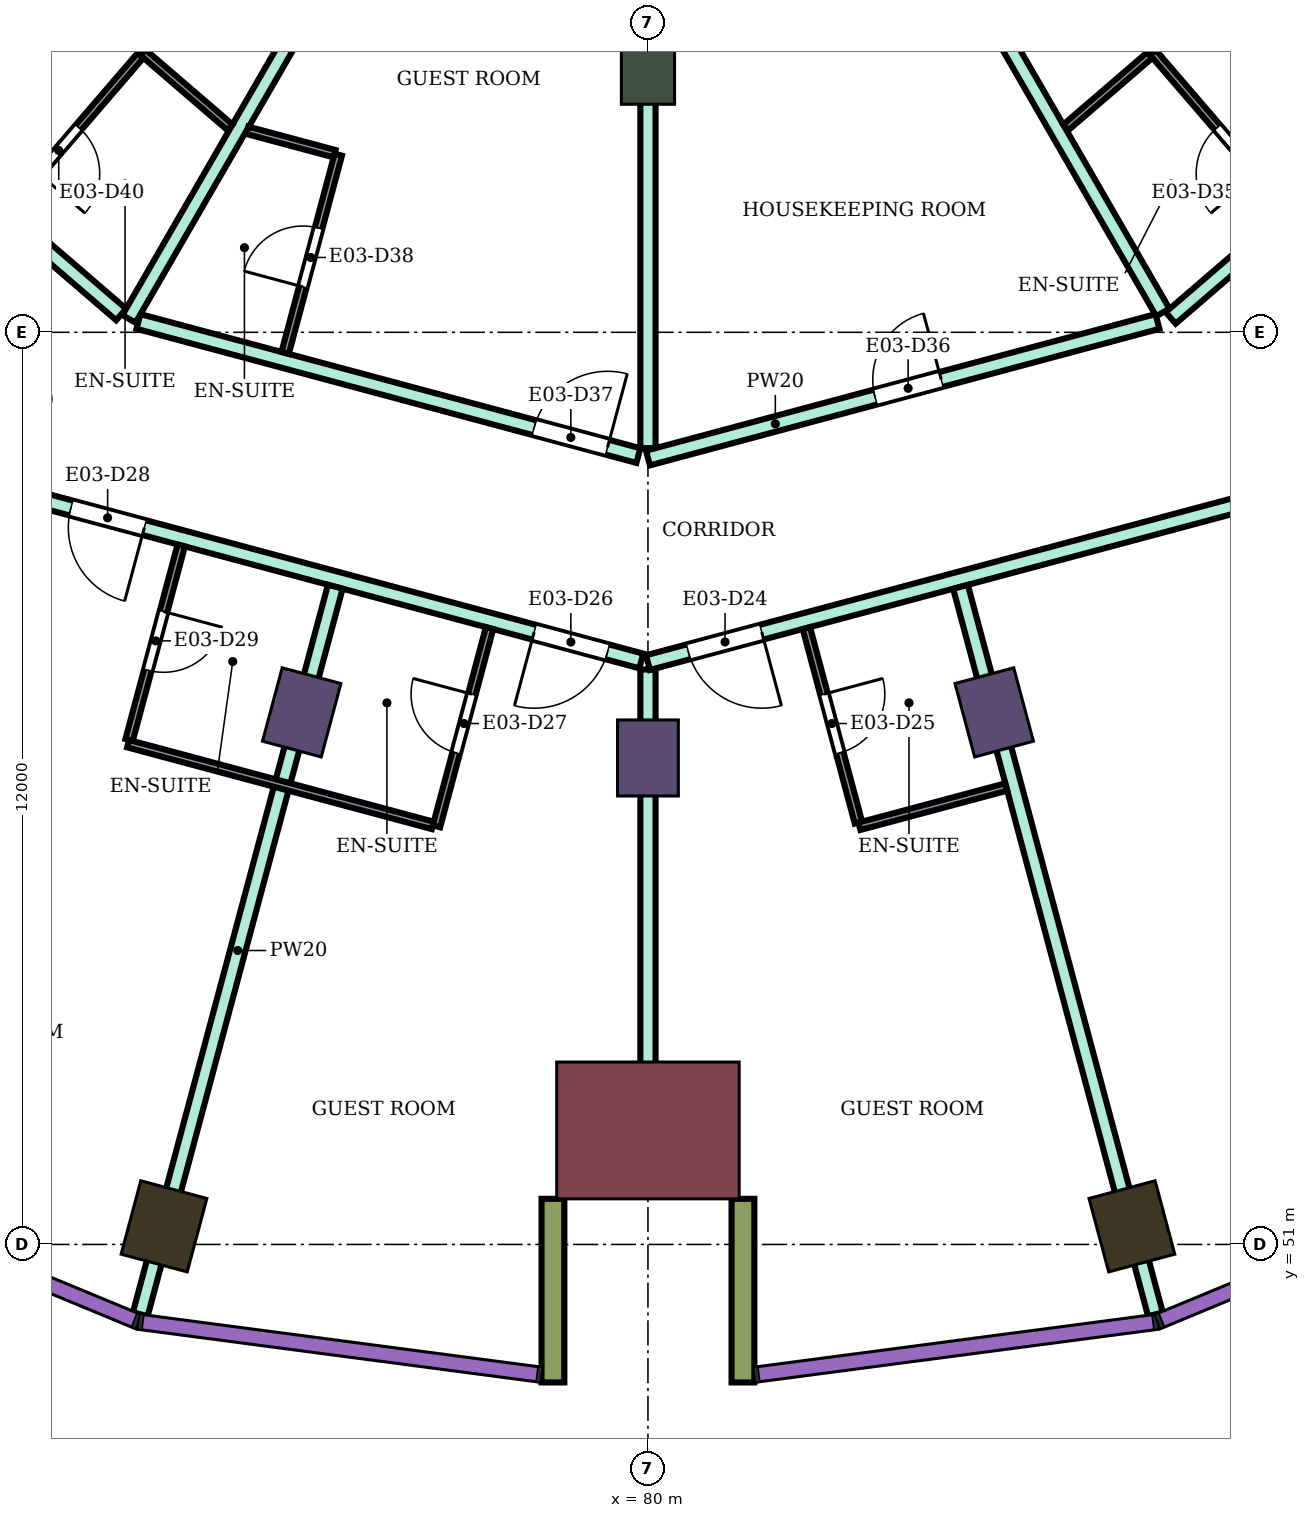
"""IFC4 building model, lengths in metres.
Left out: names, types, materials, properties, quantities, classifications, styles, units other than length and angle.
Written with IfcOpenShell. Run it as: python <this file> out.ifc"""

import sys

from ifc_helpers import new_model, si_unit, direction, frame, frame_2d, origin, origin_2d, place, context, subcontext, project, spatial, rectangle, extrude, element, fill, save


model = new_model("IFC4")
c1 = context("Model", 3, precision=1e-05, world=origin(), true_north=direction((0.0, 1.0)))
c2 = subcontext(c1, "Body", "Model", "MODEL_VIEW")
j1 = project(units=[si_unit("LENGTHUNIT", "METRE"), si_unit("PLANEANGLEUNIT", "RADIAN")], contexts=[c1])
p1 = place(None, origin())
s1 = spatial("IfcSite", under=j1, at=p1, CompositionType="ELEMENT")
p2 = place(p1, origin())
s2 = spatial("IfcBuilding", under=s1, at=p2, CompositionType="ELEMENT")
p3 = place(p2, frame((0.0, 0.0, 145.8)))
s3 = spatial("IfcBuildingStorey", under=s2, at=p3, CompositionType="ELEMENT", Elevation=145.8)
for number, where, z_axis, x_axis in (
    (1, (73.633, 51.238, 0.0), (0.0, 0.0, 1.0), (-0.259, -0.966, 0.0)),
    (2, (86.367, 51.238, 0.0), (0.0, 0.0, 1.0), (0.259, -0.966, 0.0)),
):
    element("IfcColumn", number, at=place(p3, frame(where, z_axis=z_axis, x_axis=x_axis)), inside=s3, PredefinedType="COLUMN", context=c2, shape_type="SweptSolid", body=[
        extrude(rectangle(XDim=1.0, YDim=0.9, at=origin_2d()), origin(), (0.0, 0.0, 1.0), 3.9),
    ])
for number, where, z_axis, x_axis in (
    (3, (75.445, 58.0, 0.0), (0.0, 0.0, 1.0), (-0.259, -0.966, 0.0)),
    (4, (80.0, 57.4, 0.0), (0.0, 0.0, 1.0), (0.0, -1.0, 0.0)),
    (5, (84.555, 58.0, 0.0), (0.0, 0.0, 1.0), (0.259, -0.966, 0.0)),
):
    element("IfcColumn", number, at=place(p3, frame(where, z_axis=z_axis, x_axis=x_axis)), inside=s3, PredefinedType="COLUMN", context=c2, shape_type="SweptSolid", body=[
        extrude(rectangle(XDim=1.0, YDim=0.8, at=origin_2d()), origin(), (0.0, 0.0, 1.0), 3.9),
    ])
p4 = place(p3, frame((80.0, 66.4, 0.0), z_axis=(0.0, 0.0, 1.0), x_axis=(0.0, -1.0, 0.0)))
e6 = element("IfcColumn", 6, at=p4, inside=s3, PredefinedType="COLUMN", context=c2, shape_type="SweptSolid", body=[
    extrude(rectangle(XDim=0.8, YDim=0.7, at=origin_2d()), origin(), (0.0, 0.0, 1.0), 3.9),
])
p5 = place(p3, frame((80.0, 52.5, 0.0), z_axis=(0.0, 0.0, 1.0), x_axis=(0.0, -1.0, 0.0)))
e7 = element("IfcColumn", 7, at=p5, inside=s3, PredefinedType="COLUMN", context=c2, shape_type="SweptSolid", body=[
    extrude(rectangle(XDim=1.8, YDim=2.4, at=origin_2d()), origin(), (0.0, 0.0, 1.0), 3.9),
])
for number, where, z_axis, x_axis in (
    (8, (78.75, 51.6, 0.0), (0.0, 0.0, 1.0), (0.0, -1.0, 0.0)),
    (9, (81.25, 51.6, 0.0), (0.0, 0.0, 1.0), (0.0, -1.0, 0.0)),
):
    element("IfcWall", number, at=place(p3, frame(where, z_axis=z_axis, x_axis=x_axis)), inside=s3, PredefinedType="NOTDEFINED", context=c2, shape_type="SweptSolid", body=[
        extrude(rectangle(XDim=2.416, YDim=0.3, at=frame_2d((1.208, 0.0))), origin(), (0.0, 0.0, 1.0), 3.9),
    ])
p6 = place(p3, frame((69.158, 66.6, 0.0), z_axis=(0.0, 0.0, 1.0), x_axis=(0.757976058094, -0.652282373943, 0.0)))
e10 = element("IfcWall", 10, at=p6, inside=s3, PredefinedType="PARTITIONING", context=c2, shape_type="SweptSolid", body=[
    extrude(rectangle(XDim=5.16, YDim=0.2, at=frame_2d((2.58, 0.0))), origin(), (0.0, 0.0, 1.0), 3.45),
])
p7 = place(p6, frame((1.6, 0.0, 0.0)))
e11 = element("IfcOpeningElement", 11, at=p7, cuts=e10, PredefinedType="OPENING", context=c2, shape_type="SweptSolid", body=[
    extrude(rectangle(XDim=1.0, YDim=2.1, at=frame_2d((0.5, 1.05))), frame((0.0, 0.11, 0.0), z_axis=(0.0, -1.0, 0.0), x_axis=(1.0, 0.0, 0.0)), (0.0, 0.0, 1.0), 0.22),
])
p8 = place(p3, frame((71.877, 60.832, 0.0), z_axis=(0.0, 0.0, 1.0), x_axis=(0.965852509869, -0.259092510851, 0.0)))
e12 = element("IfcWall", 12, at=p8, inside=s3, PredefinedType="PARTITIONING", context=c2, shape_type="SweptSolid", body=[
    extrude(rectangle(XDim=8.32, YDim=0.2, at=frame_2d((4.16, 0.0))), origin(), (0.0, 0.0, 1.0), 3.45),
])
p9 = place(p8, frame((6.86, 0.0, 0.0)))
e13 = element("IfcOpeningElement", 13, at=p9, cuts=e12, PredefinedType="OPENING", context=c2, shape_type="SweptSolid", body=[
    extrude(rectangle(XDim=1.0, YDim=2.1, at=frame_2d((0.5, 1.05))), frame((0.0, 0.11, 0.0), z_axis=(0.0, -1.0, 0.0), x_axis=(1.0, 0.0, 0.0)), (0.0, 0.0, 1.0), 0.22),
])
p10 = place(p8, frame((0.55, 0.0, 0.0)))
e14 = element("IfcOpeningElement", 14, at=p10, cuts=e12, PredefinedType="OPENING", context=c2, shape_type="SweptSolid", body=[
    extrude(rectangle(XDim=1.0, YDim=2.1, at=frame_2d((0.5, 1.05))), frame((0.0, 0.11, 0.0), z_axis=(0.0, -1.0, 0.0), x_axis=(1.0, 0.0, 0.0)), (0.0, 0.0, 1.0), 0.22),
])
p11 = place(p3, frame((73.297, 63.143, 0.0), z_axis=(0.0, 0.0, 1.0), x_axis=(0.965859030528, -0.25906820173, 0.0)))
e15 = element("IfcWall", 15, at=p11, inside=s3, PredefinedType="PARTITIONING", context=c2, shape_type="SweptSolid", body=[
    extrude(rectangle(XDim=6.81, YDim=0.2, at=frame_2d((3.405, 0.0))), origin(), (0.0, 0.0, 1.0), 3.45),
])
p12 = place(p11, frame((5.39, 0.0, 0.0)))
e16 = element("IfcOpeningElement", 16, at=p12, cuts=e15, PredefinedType="OPENING", context=c2, shape_type="SweptSolid", body=[
    extrude(rectangle(XDim=1.0, YDim=2.1, at=frame_2d((0.5, 1.05))), frame((0.0, 0.11, 0.0), z_axis=(0.0, -1.0, 0.0), x_axis=(1.0, 0.0, 0.0)), (0.0, 0.0, 1.0), 0.22),
])
p13 = place(p3, frame((73.173, 63.176, 0.0), z_axis=(0.0, 0.0, 1.0), x_axis=(0.500239348149, 0.865887171959, 0.0)))
e17 = element("IfcWall", 17, at=p13, inside=s3, PredefinedType="PARTITIONING", context=c2, shape_type="SweptSolid", body=[
    extrude(rectangle(XDim=5.955, YDim=0.2, at=frame_2d((2.978, 0.0))), origin(), (0.0, 0.0, 1.0), 3.45),
])
p14 = place(p3, frame((73.321, 50.081, 0.0), z_axis=(0.0, 0.0, 1.0), x_axis=(0.258889198551, 0.965907025999, 0.0)))
e18 = element("IfcWall", 18, at=p14, inside=s3, PredefinedType="PARTITIONING", context=c2, shape_type="SweptSolid", body=[
    extrude(rectangle(XDim=9.909, YDim=0.2, at=frame_2d((4.955, 0.0))), origin(), (0.0, 0.0, 1.0), 3.45),
])
p15 = place(p3, frame((80.0, 51.8, 0.0), z_axis=(0.0, 0.0, 1.0), x_axis=(0.0, 1.0, 0.0)))
e19 = element("IfcWall", 19, at=p15, inside=s3, PredefinedType="PARTITIONING", context=c2, shape_type="SweptSolid", body=[
    extrude(rectangle(XDim=6.764, YDim=0.2, at=frame_2d((3.382, 0.0))), origin(), (0.0, 0.0, 1.0), 3.45),
])
p16 = place(p3, frame((80.0, 58.654, 0.0), z_axis=(0.0, 0.0, 1.0), x_axis=(0.965979808777, 0.25861749561, 0.0)))
e20 = element("IfcWall", 20, at=p16, inside=s3, PredefinedType="PARTITIONING", context=c2, shape_type="SweptSolid", body=[
    extrude(rectangle(XDim=8.37, YDim=0.2, at=frame_2d((4.185, 0.0))), origin(), (0.0, 0.0, 1.0), 3.45),
])
p17 = place(p16, frame((0.55, 0.0, 0.0)))
e21 = element("IfcOpeningElement", 21, at=p17, cuts=e20, PredefinedType="OPENING", context=c2, shape_type="SweptSolid", body=[
    extrude(rectangle(XDim=1.0, YDim=2.1, at=frame_2d((0.5, 1.05))), frame((0.0, 0.11, 0.0), z_axis=(0.0, -1.0, 0.0), x_axis=(1.0, 0.0, 0.0)), (0.0, 0.0, 1.0), 0.22),
])
p18 = place(p3, frame((80.0, 61.476, 0.0), z_axis=(0.0, 0.0, 1.0), x_axis=(0.0, 1.0, 0.0)))
e22 = element("IfcWall", 22, at=p18, inside=s3, PredefinedType="PARTITIONING", context=c2, shape_type="SweptSolid", body=[
    extrude(rectangle(XDim=5.825, YDim=0.2, at=frame_2d((2.913, 0.0))), origin(), (0.0, 0.0, 1.0), 3.45),
])
p19 = place(p3, frame((80.0, 61.346, 0.0), z_axis=(0.0, 0.0, 1.0), x_axis=(0.965915385935, 0.25885800589, 0.0)))
e23 = element("IfcWall", 23, at=p19, inside=s3, PredefinedType="PARTITIONING", context=c2, shape_type="SweptSolid", body=[
    extrude(rectangle(XDim=6.94, YDim=0.2, at=frame_2d((3.47, 0.0))), origin(), (0.0, 0.0, 1.0), 3.45),
])
p20 = place(p19, frame((3.094, 0.0, 0.0)))
e24 = element("IfcOpeningElement", 24, at=p20, cuts=e23, PredefinedType="OPENING", context=c2, shape_type="SweptSolid", body=[
    extrude(rectangle(XDim=0.9, YDim=2.1, at=frame_2d((0.45, 1.05))), frame((0.0, 0.11, 0.0), z_axis=(0.0, -1.0, 0.0), x_axis=(1.0, 0.0, 0.0)), (0.0, 0.0, 1.0), 0.22),
])
p21 = place(p3, frame((83.847, 68.332, 0.0), z_axis=(0.0, 0.0, 1.0), x_axis=(0.499901724708, -0.866082135617, 0.0)))
e25 = element("IfcWall", 25, at=p21, inside=s3, PredefinedType="PARTITIONING", context=c2, shape_type="SweptSolid", body=[
    extrude(rectangle(XDim=5.855, YDim=0.2, at=frame_2d((2.928, 0.0))), origin(), (0.0, 0.0, 1.0), 3.45),
])
p22 = place(p3, frame((84.112, 59.652, 0.0), z_axis=(0.0, 0.0, 1.0), x_axis=(0.25878658041, -0.965934524593, 0.0)))
e26 = element("IfcWall", 26, at=p22, inside=s3, PredefinedType="PARTITIONING", context=c2, shape_type="SweptSolid", body=[
    extrude(rectangle(XDim=9.909, YDim=0.2, at=frame_2d((4.954, 0.0))), origin(), (0.0, 0.0, 1.0), 3.45),
])
p23 = place(p3, frame((86.877, 63.189, 0.0), z_axis=(0.0, 0.0, 1.0), x_axis=(0.758164888471, 0.652062881853, 0.0)))
e27 = element("IfcWall", 27, at=p23, inside=s3, PredefinedType="PARTITIONING", context=c2, shape_type="SweptSolid", body=[
    extrude(rectangle(XDim=5.23, YDim=0.2, at=frame_2d((2.615, 0.0))), origin(), (0.0, 0.0, 1.0), 3.45),
])
p24 = place(p23, frame((2.63, 0.0, 0.0)))
e28 = element("IfcOpeningElement", 28, at=p24, cuts=e27, PredefinedType="OPENING", context=c2, shape_type="SweptSolid", body=[
    extrude(rectangle(XDim=1.0, YDim=2.1, at=frame_2d((0.5, 1.05))), frame((0.0, 0.11, 0.0), z_axis=(0.0, -1.0, 0.0), x_axis=(1.0, 0.0, 0.0)), (0.0, 0.0, 1.0), 0.22),
])
p25 = place(p3, frame((71.596, 64.635, 0.0), z_axis=(0.0, 0.0, 1.0), x_axis=(0.652285007511, 0.757973791748, 0.0)))
e29 = element("IfcWall", 29, at=p25, inside=s3, PredefinedType="PARTITIONING", context=c2, shape_type="SweptSolid", body=[
    extrude(rectangle(XDim=2.65, YDim=0.1, at=frame_2d((1.325, 0.0))), origin(), (0.0, 0.0, 1.0), 3.45),
])
p26 = place(p25, frame((0.6, 0.0, 0.0)))
e30 = element("IfcOpeningElement", 30, at=p26, cuts=e29, PredefinedType="OPENING", context=c2, shape_type="SweptSolid", body=[
    extrude(rectangle(XDim=0.8, YDim=2.1, at=frame_2d((0.4, 1.05))), frame((0.0, 0.06, 0.0), z_axis=(0.0, -1.0, 0.0), x_axis=(1.0, 0.0, 0.0)), (0.0, 0.0, 1.0), 0.12),
])
p27 = place(p3, frame((73.174, 57.636, 0.0), z_axis=(0.0, 0.0, 1.0), x_axis=(0.258952498977, 0.96589005755, 0.0)))
e31 = element("IfcWall", 31, at=p27, inside=s3, PredefinedType="PARTITIONING", context=c2, shape_type="SweptSolid", body=[
    extrude(rectangle(XDim=2.65, YDim=0.1, at=frame_2d((1.325, 0.0))), origin(), (0.0, 0.0, 1.0), 3.45),
])
p28 = place(p27, frame((0.95, 0.0, 0.0)))
e32 = element("IfcOpeningElement", 32, at=p28, cuts=e31, PredefinedType="OPENING", context=c2, shape_type="SweptSolid", body=[
    extrude(rectangle(XDim=0.8, YDim=2.1, at=frame_2d((0.4, 1.05))), frame((0.0, 0.06, 0.0), z_axis=(0.0, -1.0, 0.0), x_axis=(1.0, 0.0, 0.0)), (0.0, 0.0, 1.0), 0.12),
])
p29 = place(p3, frame((73.161, 57.588, 0.0), z_axis=(0.0, 0.0, 1.0), x_axis=(0.965858994467, -0.259068336173, 0.0)))
e33 = element("IfcWall", 33, at=p29, inside=s3, PredefinedType="PARTITIONING", context=c2, shape_type="SweptSolid", body=[
    extrude(rectangle(XDim=4.15, YDim=0.1, at=frame_2d((2.075, 0.0))), origin(), (0.0, 0.0, 1.0), 3.45),
])
p30 = place(p3, frame((73.357, 66.681, 0.0), z_axis=(0.0, 0.0, 1.0), x_axis=(0.758263469747, -0.651948242154, 0.0)))
e34 = element("IfcWall", 34, at=p30, inside=s3, PredefinedType="PARTITIONING", context=c2, shape_type="SweptSolid", body=[
    extrude(rectangle(XDim=1.511, YDim=0.1, at=frame_2d((0.755, 0.0))), origin(), (0.0, 0.0, 1.0), 3.45),
])
p31 = place(p3, frame((74.729, 65.657, 0.0), z_axis=(0.0, 0.0, 1.0), x_axis=(0.965948051503, -0.258736085224, 0.0)))
e35 = element("IfcWall", 35, at=p31, inside=s3, PredefinedType="PARTITIONING", context=c2, shape_type="SweptSolid", body=[
    extrude(rectangle(XDim=1.189, YDim=0.1, at=frame_2d((0.594, 0.0))), origin(), (0.0, 0.0, 1.0), 3.45),
])
p32 = place(p3, frame((75.227, 62.729, 0.0), z_axis=(0.0, 0.0, 1.0), x_axis=(0.258945475746, 0.965891940432, 0.0)))
e36 = element("IfcWall", 36, at=p32, inside=s3, PredefinedType="PARTITIONING", context=c2, shape_type="SweptSolid", body=[
    extrude(rectangle(XDim=2.7, YDim=0.1, at=frame_2d((1.35, 0.0))), origin(), (0.0, 0.0, 1.0), 3.45),
])
p33 = place(p32, frame((0.9, 0.0, 0.0)))
e37 = element("IfcOpeningElement", 37, at=p33, cuts=e36, PredefinedType="OPENING", context=c2, shape_type="SweptSolid", body=[
    extrude(rectangle(XDim=0.8, YDim=2.1, at=frame_2d((0.4, 1.05))), frame((0.0, 0.06, 0.0), z_axis=(0.0, -1.0, 0.0), x_axis=(1.0, 0.0, 0.0)), (0.0, 0.0, 1.0), 0.12),
])
p34 = place(p3, frame((77.218, 56.501, 0.0), z_axis=(0.0, 0.0, 1.0), x_axis=(0.258591408257, 0.965986792651, 0.0)))
e38 = element("IfcWall", 38, at=p34, inside=s3, PredefinedType="PARTITIONING", context=c2, shape_type="SweptSolid", body=[
    extrude(rectangle(XDim=2.699, YDim=0.1, at=frame_2d((1.35, 0.0))), origin(), (0.0, 0.0, 1.0), 3.45),
])
p35 = place(p34, frame((1.0, 0.0, 0.0)))
e39 = element("IfcOpeningElement", 39, at=p35, cuts=e38, PredefinedType="OPENING", context=c2, shape_type="SweptSolid", body=[
    extrude(rectangle(XDim=0.8, YDim=2.1, at=frame_2d((0.4, 1.05))), frame((0.0, 0.06, 0.0), z_axis=(0.0, -1.0, 0.0), x_axis=(1.0, 0.0, 0.0)), (0.0, 0.0, 1.0), 0.12),
])
p36 = place(p3, frame((82.084, 59.108, 0.0), z_axis=(0.0, 0.0, 1.0), x_axis=(0.258591746437, -0.965986702121, 0.0)))
e40 = element("IfcWall", 40, at=p36, inside=s3, PredefinedType="PARTITIONING", context=c2, shape_type="SweptSolid", body=[
    extrude(rectangle(XDim=2.649, YDim=0.1, at=frame_2d((1.325, 0.0))), origin(), (0.0, 0.0, 1.0), 3.45),
])
p37 = place(p36, frame((0.9, 0.0, 0.0)))
e41 = element("IfcOpeningElement", 41, at=p37, cuts=e40, PredefinedType="OPENING", context=c2, shape_type="SweptSolid", body=[
    extrude(rectangle(XDim=0.8, YDim=2.1, at=frame_2d((0.4, 1.05))), frame((0.0, 0.06, 0.0), z_axis=(0.0, -1.0, 0.0), x_axis=(1.0, 0.0, 0.0)), (0.0, 0.0, 1.0), 0.12),
])
p38 = place(p3, frame((82.782, 56.501, 0.0), z_axis=(0.0, 0.0, 1.0), x_axis=(0.966003594778, 0.258528634539, 0.0)))
e42 = element("IfcWall", 42, at=p38, inside=s3, PredefinedType="PARTITIONING", context=c2, shape_type="SweptSolid", body=[
    extrude(rectangle(XDim=2.0, YDim=0.1, at=frame_2d((1.0, 0.0))), origin(), (0.0, 0.0, 1.0), 3.45),
])
p39 = place(p3, frame((85.497, 65.696, 0.0), z_axis=(0.0, 0.0, 1.0), x_axis=(0.75817032582, 0.652056559698, 0.0)))
e43 = element("IfcWall", 43, at=p39, inside=s3, PredefinedType="PARTITIONING", context=c2, shape_type="SweptSolid", body=[
    extrude(rectangle(XDim=1.461, YDim=0.1, at=frame_2d((0.73, 0.0))), origin(), (0.0, 0.0, 1.0), 3.45),
])
p40 = place(p3, frame((86.643, 66.681, 0.0), z_axis=(0.0, 0.0, 1.0), x_axis=(0.652264876065, -0.757991115682, 0.0)))
e44 = element("IfcWall", 44, at=p40, inside=s3, PredefinedType="PARTITIONING", context=c2, shape_type="SweptSolid", body=[
    extrude(rectangle(XDim=2.699, YDim=0.1, at=frame_2d((1.35, 0.0))), origin(), (0.0, 0.0, 1.0), 3.45),
])
p41 = place(p40, frame((1.3, 0.0, 0.0)))
e45 = element("IfcOpeningElement", 45, at=p41, cuts=e44, PredefinedType="OPENING", context=c2, shape_type="SweptSolid", body=[
    extrude(rectangle(XDim=0.8, YDim=2.1, at=frame_2d((0.4, 1.05))), frame((0.0, 0.06, 0.0), z_axis=(0.0, -1.0, 0.0), x_axis=(1.0, 0.0, 0.0)), (0.0, 0.0, 1.0), 0.12),
])
p42 = place(p17, frame((1.0, 0.0, 0.0), z_axis=(0.0, 0.0, 1.0), x_axis=(-1.0, 0.0, 0.0)))
e46 = element("IfcDoor", 46, at=p42, inside=s3, OperationType="SINGLE_SWING_LEFT", PredefinedType="DOOR", context=c2, shape_type="SweptSolid", body=[
    extrude(rectangle(XDim=1.0, YDim=2.1, at=frame_2d((0.5, 1.05))), frame((0.0, 0.025, 0.0), z_axis=(0.0, -1.0, 0.0), x_axis=(1.0, 0.0, 0.0)), (0.0, 0.0, 1.0), 0.05),
])
fill(e21, e46)
p43 = place(p37, origin())
e47 = element("IfcDoor", 47, at=p43, inside=s3, OperationType="SINGLE_SWING_LEFT", PredefinedType="DOOR", context=c2, shape_type="SweptSolid", body=[
    extrude(rectangle(XDim=0.8, YDim=2.1, at=frame_2d((0.4, 1.05))), frame((0.0, 0.025, 0.0), z_axis=(0.0, -1.0, 0.0), x_axis=(1.0, 0.0, 0.0)), (0.0, 0.0, 1.0), 0.05),
])
fill(e41, e47)
p44 = place(p9, frame((1.0, 0.0, 0.0), z_axis=(0.0, 0.0, 1.0), x_axis=(-1.0, 0.0, 0.0)))
e48 = element("IfcDoor", 48, at=p44, inside=s3, OperationType="SINGLE_SWING_RIGHT", PredefinedType="DOOR", context=c2, shape_type="SweptSolid", body=[
    extrude(rectangle(XDim=1.0, YDim=2.1, at=frame_2d((0.5, 1.05))), frame((0.0, 0.025, 0.0), z_axis=(0.0, -1.0, 0.0), x_axis=(1.0, 0.0, 0.0)), (0.0, 0.0, 1.0), 0.05),
])
fill(e13, e48)
p45 = place(p35, origin())
e49 = element("IfcDoor", 49, at=p45, inside=s3, OperationType="SINGLE_SWING_RIGHT", PredefinedType="DOOR", context=c2, shape_type="SweptSolid", body=[
    extrude(rectangle(XDim=0.8, YDim=2.1, at=frame_2d((0.4, 1.05))), frame((0.0, 0.025, 0.0), z_axis=(0.0, -1.0, 0.0), x_axis=(1.0, 0.0, 0.0)), (0.0, 0.0, 1.0), 0.05),
])
fill(e39, e49)
p46 = place(p10, frame((1.0, 0.0, 0.0), z_axis=(0.0, 0.0, 1.0), x_axis=(-1.0, 0.0, 0.0)))
e50 = element("IfcDoor", 50, at=p46, inside=s3, OperationType="SINGLE_SWING_LEFT", PredefinedType="DOOR", context=c2, shape_type="SweptSolid", body=[
    extrude(rectangle(XDim=1.0, YDim=2.1, at=frame_2d((0.5, 1.05))), frame((0.0, 0.025, 0.0), z_axis=(0.0, -1.0, 0.0), x_axis=(1.0, 0.0, 0.0)), (0.0, 0.0, 1.0), 0.05),
])
fill(e14, e50)
p47 = place(p28, frame((0.8, 0.0, 0.0), z_axis=(0.0, 0.0, 1.0), x_axis=(-1.0, 0.0, 0.0)))
e51 = element("IfcDoor", 51, at=p47, inside=s3, OperationType="SINGLE_SWING_LEFT", PredefinedType="DOOR", context=c2, shape_type="SweptSolid", body=[
    extrude(rectangle(XDim=0.8, YDim=2.1, at=frame_2d((0.4, 1.05))), frame((0.0, 0.025, 0.0), z_axis=(0.0, -1.0, 0.0), x_axis=(1.0, 0.0, 0.0)), (0.0, 0.0, 1.0), 0.05),
])
fill(e32, e51)
p48 = place(p41, frame((0.8, 0.0, 0.0), z_axis=(0.0, 0.0, 1.0), x_axis=(-1.0, 0.0, 0.0)))
e52 = element("IfcDoor", 52, at=p48, inside=s3, OperationType="SINGLE_SWING_LEFT", PredefinedType="DOOR", context=c2, shape_type="SweptSolid", body=[
    extrude(rectangle(XDim=0.8, YDim=2.1, at=frame_2d((0.4, 1.05))), frame((0.0, 0.025, 0.0), z_axis=(0.0, -1.0, 0.0), x_axis=(1.0, 0.0, 0.0)), (0.0, 0.0, 1.0), 0.05),
])
fill(e45, e52)
p49 = place(p20, origin())
e53 = element("IfcDoor", 53, at=p49, inside=s3, OperationType="SINGLE_SWING_RIGHT", PredefinedType="DOOR", context=c2, shape_type="SweptSolid", body=[
    extrude(rectangle(XDim=0.9, YDim=2.1, at=frame_2d((0.45, 1.05))), frame((0.0, 0.025, 0.0), z_axis=(0.0, -1.0, 0.0), x_axis=(1.0, 0.0, 0.0)), (0.0, 0.0, 1.0), 0.05),
])
fill(e24, e53)
p50 = place(p12, origin())
e54 = element("IfcDoor", 54, at=p50, inside=s3, OperationType="SINGLE_SWING_RIGHT", PredefinedType="DOOR", context=c2, shape_type="SweptSolid", body=[
    extrude(rectangle(XDim=1.0, YDim=2.1, at=frame_2d((0.5, 1.05))), frame((0.0, 0.025, 0.0), z_axis=(0.0, -1.0, 0.0), x_axis=(1.0, 0.0, 0.0)), (0.0, 0.0, 1.0), 0.05),
])
fill(e16, e54)
p51 = place(p33, origin())
e55 = element("IfcDoor", 55, at=p51, inside=s3, OperationType="SINGLE_SWING_LEFT", PredefinedType="DOOR", context=c2, shape_type="SweptSolid", body=[
    extrude(rectangle(XDim=0.8, YDim=2.1, at=frame_2d((0.4, 1.05))), frame((0.0, 0.025, 0.0), z_axis=(0.0, -1.0, 0.0), x_axis=(1.0, 0.0, 0.0)), (0.0, 0.0, 1.0), 0.05),
])
fill(e37, e55)
p52 = place(p26, frame((0.8, 0.0, 0.0), z_axis=(0.0, 0.0, 1.0), x_axis=(-1.0, 0.0, 0.0)))
e56 = element("IfcDoor", 56, at=p52, inside=s3, OperationType="SINGLE_SWING_RIGHT", PredefinedType="DOOR", context=c2, shape_type="SweptSolid", body=[
    extrude(rectangle(XDim=0.8, YDim=2.1, at=frame_2d((0.4, 1.05))), frame((0.0, 0.025, 0.0), z_axis=(0.0, -1.0, 0.0), x_axis=(1.0, 0.0, 0.0)), (0.0, 0.0, 1.0), 0.05),
])
fill(e30, e56)
save(model, sys.argv[1])
